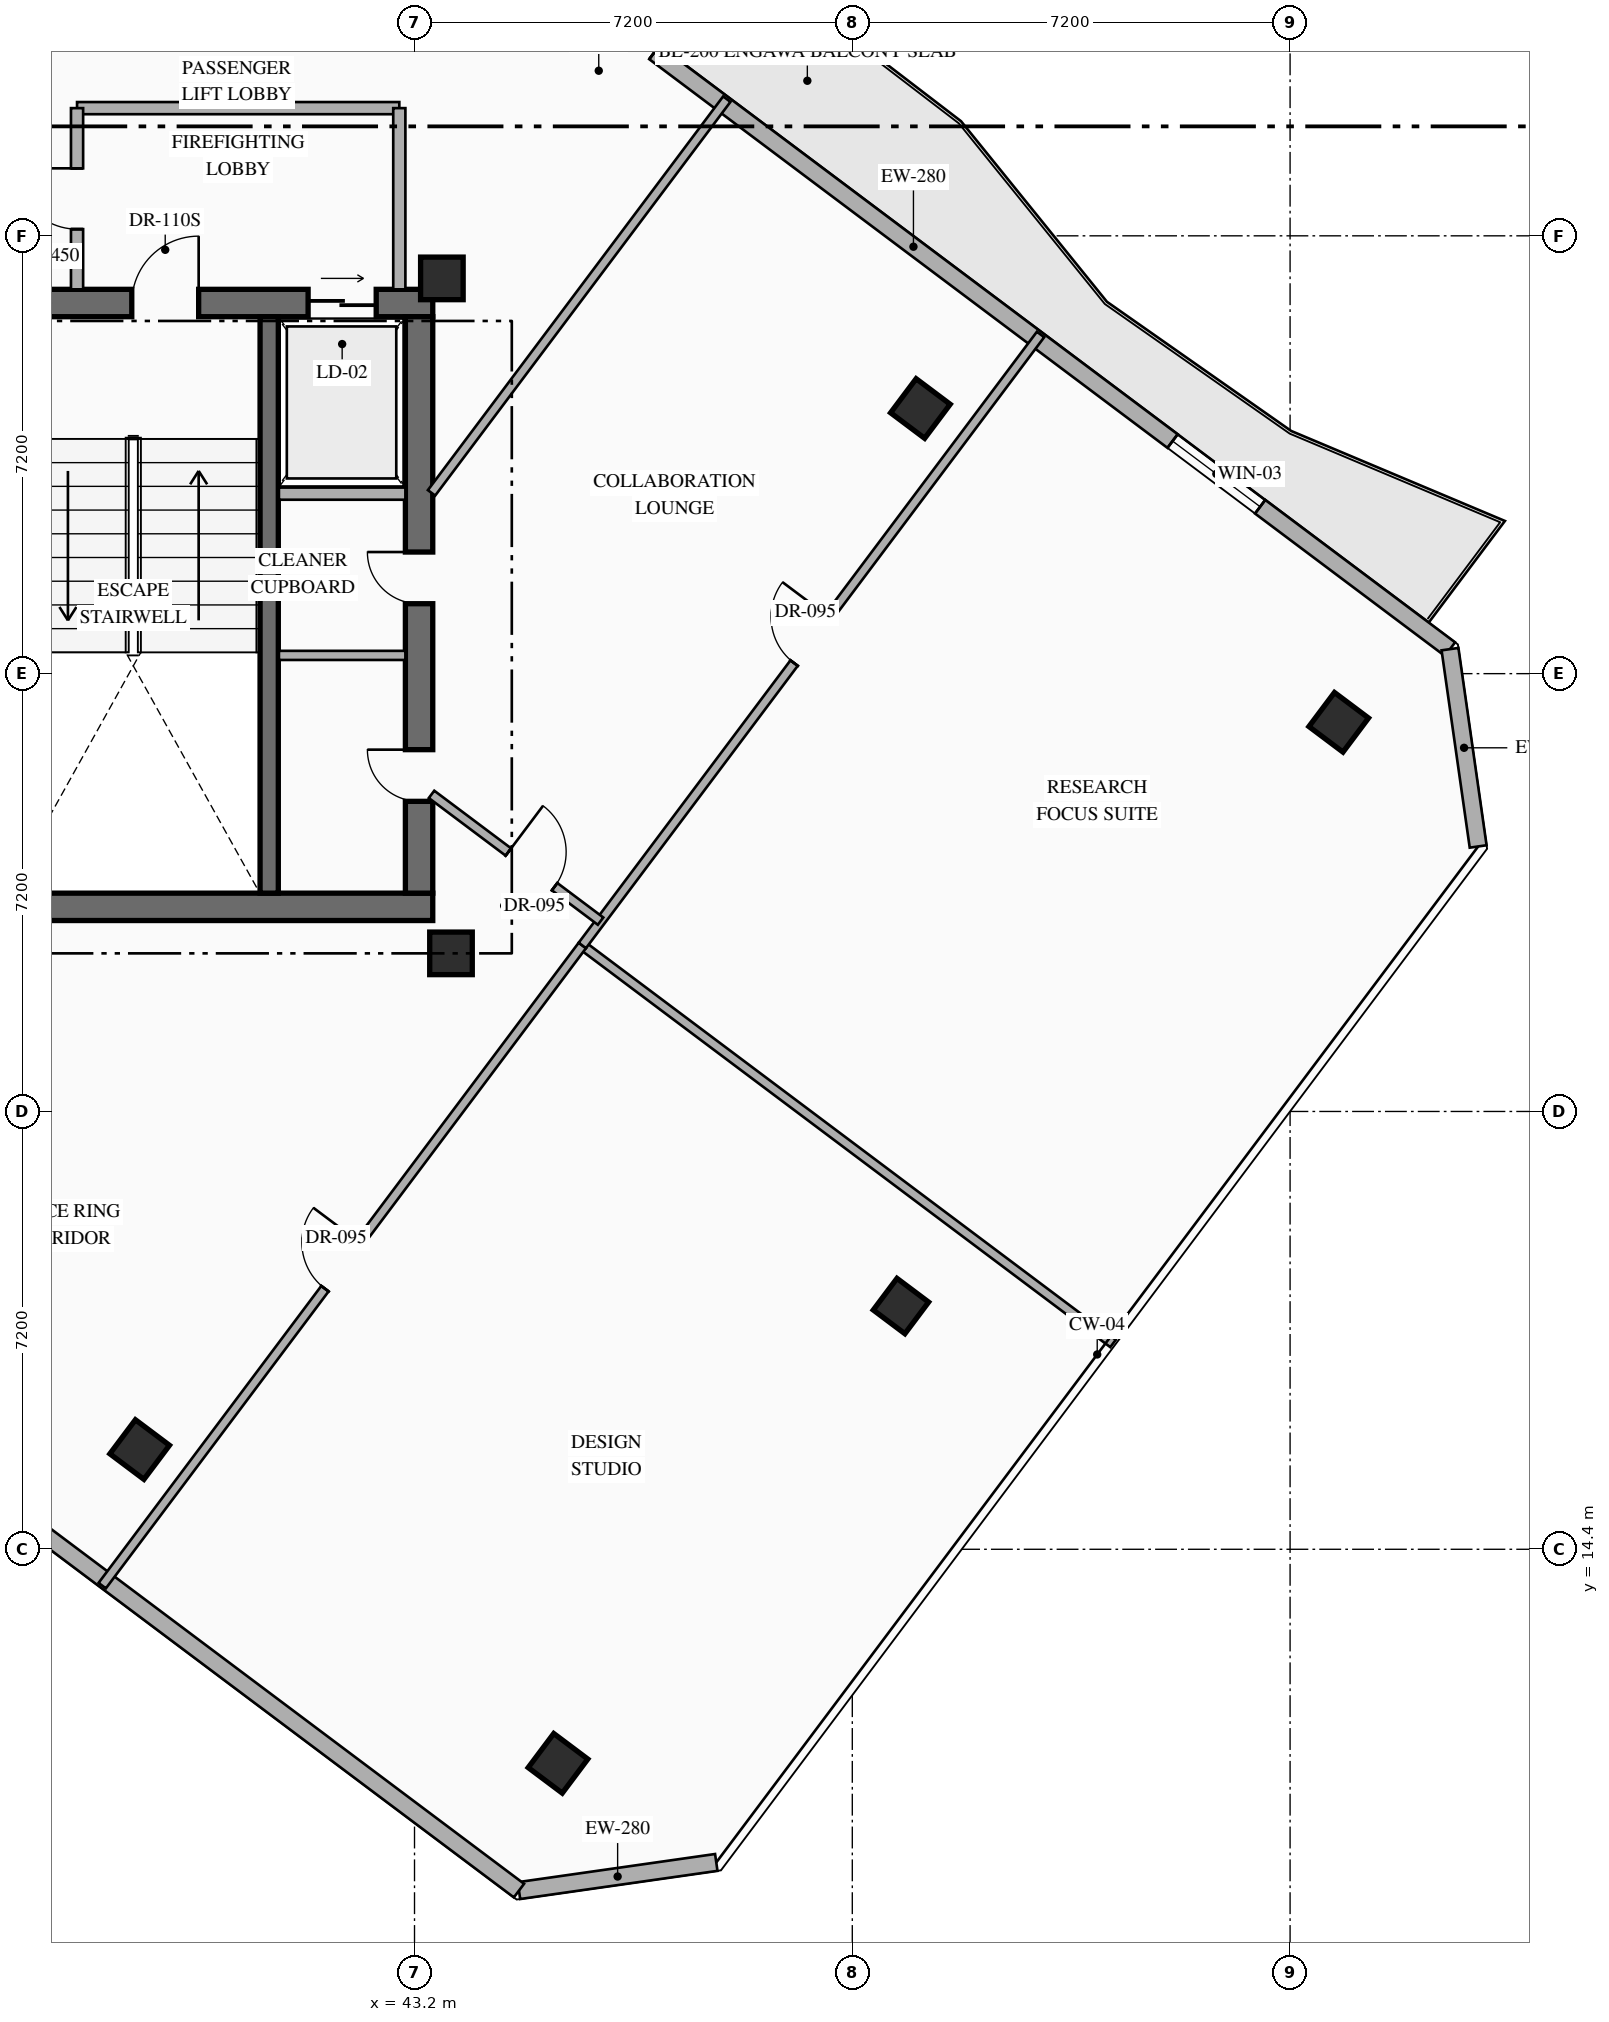
"""IFC4 building model, lengths in metres.
Left out: names, types, materials, properties, quantities, classifications, styles, units other than length and angle.
Written with IfcOpenShell. Run it as: python <this file> out.ifc"""

import sys

from ifc_helpers import new_model, si_unit, direction, frame, frame_2d, origin, origin_2d, place, context, subcontext, project, spatial, rectangle, hollow_rectangle, extrude, element, fill, save


model = new_model("IFC4")
c1 = context("Model", 3, precision=1e-05, world=origin(), true_north=direction((0.0, 1.0)))
c2 = subcontext(c1, "Body", "Model", "MODEL_VIEW")
j1 = project(units=[si_unit("LENGTHUNIT", "METRE"), si_unit("PLANEANGLEUNIT", "RADIAN")], contexts=[c1])
p1 = place(None, origin())
s1 = spatial("IfcSite", under=j1, at=p1, CompositionType="ELEMENT")
p2 = place(p1, origin())
s2 = spatial("IfcBuilding", under=s1, at=p2, CompositionType="ELEMENT")
p3 = place(p2, frame((0.0, 0.0, 231.15)))
s3 = spatial("IfcBuildingStorey", under=s2, at=p3, CompositionType="ELEMENT", Elevation=231.15)
p4 = place(p3, frame((36.04, 24.965, 0.0), z_axis=(0.0, 0.0, 1.0), x_axis=(1.0, 0.0, 0.0)))
e1 = element("IfcWall", 1, at=p4, inside=s3, PredefinedType="SHEAR", context=c2, shape_type="SweptSolid", body=[
    extrude(rectangle(XDim=7.46, YDim=0.45, at=frame_2d((3.73, 0.0))), origin(), (0.0, 0.0, 1.0), 3.6),
])
p5 = place(p3, frame((36.04, 34.895, 0.0), z_axis=(0.0, 0.0, 1.0), x_axis=(1.0, 0.0, 0.0)))
e2 = element("IfcWall", 2, at=p5, inside=s3, PredefinedType="SHEAR", context=c2, shape_type="SweptSolid", body=[
    extrude(rectangle(XDim=7.46, YDim=0.45, at=frame_2d((3.73, 0.0))), origin(), (0.0, 0.0, 1.0), 3.6),
])
p6 = place(p5, frame((2.51, 0.0, 0.0)))
e3 = element("IfcOpeningElement", 3, at=p6, cuts=e2, PredefinedType="OPENING", context=c2, shape_type="SweptSolid", body=[
    extrude(rectangle(XDim=1.1, YDim=2.2, at=frame_2d((0.55, 1.1))), frame((0.0, 0.235, 0.0), z_axis=(0.0, -1.0, 0.0), x_axis=(1.0, 0.0, 0.0)), (0.0, 0.0, 1.0), 0.47),
])
p7 = place(p5, frame((5.41, 0.0, 0.0)))
e4 = element("IfcOpeningElement", 4, at=p7, cuts=e2, PredefinedType="OPENING", context=c2, shape_type="SweptSolid", body=[
    extrude(rectangle(XDim=1.12, YDim=2.15, at=frame_2d((0.56, 1.075))), frame((0.0, 0.235, 0.0), z_axis=(0.0, -1.0, 0.0), x_axis=(1.0, 0.0, 0.0)), (0.0, 0.0, 1.0), 0.47),
])
p8 = place(p3, frame((43.275, 25.19, 0.0), z_axis=(0.0, 0.0, 1.0), x_axis=(0.0, 1.0, 0.0)))
e5 = element("IfcWall", 5, at=p8, inside=s3, PredefinedType="SHEAR", context=c2, shape_type="SweptSolid", body=[
    extrude(rectangle(XDim=9.48, YDim=0.45, at=frame_2d((4.74, 0.0))), origin(), (0.0, 0.0, 1.0), 3.6),
])
p9 = place(p8, frame((1.51, 0.0, 0.0)))
e6 = element("IfcOpeningElement", 6, at=p9, cuts=e5, PredefinedType="OPENING", context=c2, shape_type="SweptSolid", body=[
    extrude(rectangle(XDim=0.85, YDim=2.08, at=frame_2d((0.425, 1.04))), frame((0.0, 0.235, 0.0), z_axis=(0.0, -1.0, 0.0), x_axis=(1.0, 0.0, 0.0)), (0.0, 0.0, 1.0), 0.47),
])
p10 = place(p8, frame((4.76, 0.0, 0.0)))
e7 = element("IfcOpeningElement", 7, at=p10, cuts=e5, PredefinedType="OPENING", context=c2, shape_type="SweptSolid", body=[
    extrude(rectangle(XDim=0.85, YDim=2.08, at=frame_2d((0.425, 1.04))), frame((0.0, 0.235, 0.0), z_axis=(0.0, -1.0, 0.0), x_axis=(1.0, 0.0, 0.0)), (0.0, 0.0, 1.0), 0.47),
])
p11 = place(p3, frame((40.81, 25.19, 0.0), z_axis=(0.0, 0.0, 1.0), x_axis=(0.0, 1.0, 0.0)))
e8 = element("IfcWall", 8, at=p11, inside=s3, PredefinedType="SHEAR", context=c2, shape_type="SweptSolid", body=[
    extrude(rectangle(XDim=9.48, YDim=0.3, at=frame_2d((4.74, 0.0))), origin(), (0.0, 0.0, 1.0), 3.6),
])
for number, where, z_axis, x_axis in (
    (9, (43.8, 24.2, 0.0), (0.0, 0.0, 1.0), (1.0, 0.0, 0.0)),
    (10, (43.65, 35.3, 0.0), (0.0, 0.0, 1.0), (1.0, 0.0, 0.0)),
    (11, (38.68, 16.04, 0.0), (0.0, 0.0, 1.0), (0.8, -0.6, 0.0)),
    (12, (51.52, 33.16, 0.0), (0.0, 0.0, 1.0), (0.8, -0.6, 0.0)),
):
    element("IfcColumn", number, at=place(p3, frame(where, z_axis=z_axis, x_axis=x_axis)), inside=s3, PredefinedType="COLUMN", context=c2, shape_type="SweptSolid", body=[
        extrude(hollow_rectangle(XDim=0.7, YDim=0.7, WallThickness=0.028, at=origin_2d()), origin(), (0.0, 0.0, 1.0), 3.6),
    ])
for number, where, z_axis, x_axis in (
    (13, (45.56, 10.88, 0.0), (0.0, 0.0, 1.0), (0.8, -0.6, 0.0)),
    (14, (58.4, 28.0, 0.0), (0.0, 0.0, 1.0), (0.8, -0.6, 0.0)),
):
    element("IfcColumn", number, at=place(p3, frame(where, z_axis=z_axis, x_axis=x_axis)), inside=s3, PredefinedType="COLUMN", context=c2, shape_type="SweptSolid", body=[
        extrude(hollow_rectangle(XDim=0.7, YDim=0.7, WallThickness=0.028, at=origin_2d()), origin(), (0.0, 0.0, 1.0), 3.268),
    ])
p12 = place(p3, frame((51.2, 18.4, 0.0), z_axis=(0.0, 0.0, 1.0), x_axis=(0.799999996291, -0.600000004945, 0.0)))
e15 = element("IfcColumn", 15, at=p12, inside=s3, PredefinedType="COLUMN", context=c2, shape_type="SweptSolid", body=[
    extrude(hollow_rectangle(XDim=0.65, YDim=0.65, WallThickness=0.025, at=origin_2d()), origin(), (0.0, 0.0, 1.0), 3.268),
])
p13 = place(p3, frame((44.86, 40.73, 0.0), z_axis=(0.0, 0.0, 1.0), x_axis=(0.800007624502, -0.599989833863, 0.0)))
e16 = element("IfcWall", 16, at=p13, inside=s3, PredefinedType="STANDARD", context=c2, shape_type="SweptSolid", body=[
    extrude(rectangle(XDim=19.212, YDim=0.28, at=frame_2d((9.606, 0.0))), origin(), (0.0, 0.0, 1.0), 3.3),
])
p14 = place(p13, frame((1.755, 0.0, 0.0)))
e17 = element("IfcOpeningElement", 17, at=p14, cuts=e16, PredefinedType="OPENING", context=c2, shape_type="SweptSolid", body=[
    extrude(rectangle(XDim=1.1, YDim=2.2, at=frame_2d((0.55, 1.1))), frame((0.0, 0.15, 0.0), z_axis=(0.0, -1.0, 0.0), x_axis=(1.0, 0.0, 0.0)), (0.0, 0.0, 1.0), 0.3),
])
p15 = place(p13, frame((13.509, 0.0, 0.85)))
e18 = element("IfcOpeningElement", 18, at=p15, cuts=e16, PredefinedType="OPENING", context=c2, shape_type="SweptSolid", body=[
    extrude(rectangle(XDim=1.8, YDim=2.1, at=frame_2d((0.9, 1.05))), frame((0.0, 0.15, 0.0), z_axis=(0.0, -1.0, 0.0), x_axis=(1.0, 0.0, 0.0)), (0.0, 0.0, 1.0), 0.3),
])
p16 = place(p3, frame((60.23, 29.203, 0.0), z_axis=(0.0, 0.0, 1.0), x_axis=(0.141296221922, -0.989967361922, 0.0)))
e19 = element("IfcWall", 19, at=p16, inside=s3, PredefinedType="STANDARD", context=c2, shape_type="SweptSolid", body=[
    extrude(rectangle(XDim=3.278, YDim=0.28, at=frame_2d((1.639, 0.0))), origin(), (0.0, 0.0, 1.0), 3.3),
])
p17 = place(p3, frame((48.163, 9.25, 0.0), z_axis=(0.0, 0.0, 1.0), x_axis=(-0.989979263428, -0.141212810973, 0.0)))
e20 = element("IfcWall", 20, at=p17, inside=s3, PredefinedType="STANDARD", context=c2, shape_type="SweptSolid", body=[
    extrude(rectangle(XDim=3.278, YDim=0.28, at=frame_2d((1.639, 0.0))), origin(), (0.0, 0.0, 1.0), 3.3),
])
p18 = place(p3, frame((44.918, 8.787, 0.0), z_axis=(0.0, 0.0, 1.0), x_axis=(-0.800004765927, 0.599993645378, 0.0)))
e21 = element("IfcWall", 21, at=p18, inside=s3, PredefinedType="STANDARD", context=c2, shape_type="SweptSolid", body=[
    extrude(rectangle(XDim=24.588, YDim=0.28, at=frame_2d((12.294, 0.0))), origin(), (0.0, 0.0, 1.0), 3.3),
])
p19 = place(p3, frame((40.97, 31.76, 0.0), z_axis=(0.0, 0.0, 1.0), x_axis=(1.0, 0.0, 0.0)))
e22 = element("IfcWall", 22, at=p19, inside=s3, PredefinedType="STANDARD", context=c2, shape_type="SweptSolid", body=[
    extrude(rectangle(XDim=2.08, YDim=0.2, at=frame_2d((1.04, 0.0))), origin(), (0.0, 0.0, 1.0), 3.3),
])
p20 = place(p3, frame((40.97, 29.1, 0.0), z_axis=(0.0, 0.0, 1.0), x_axis=(1.0, 0.0, 0.0)))
e23 = element("IfcWall", 23, at=p20, inside=s3, PredefinedType="PARTITIONING", context=c2, shape_type="SweptSolid", body=[
    extrude(rectangle(XDim=2.08, YDim=0.15, at=frame_2d((1.04, 0.0))), origin(), (0.0, 0.0, 1.0), 3.3),
])
p21 = place(p3, frame((37.65, 38.1, 0.0), z_axis=(0.0, 0.0, 1.0), x_axis=(1.0, 0.0, 0.0)))
e24 = element("IfcWall", 24, at=p21, inside=s3, PredefinedType="STANDARD", context=c2, shape_type="SweptSolid", body=[
    extrude(rectangle(XDim=5.3, YDim=0.2, at=frame_2d((2.65, 0.0))), origin(), (0.0, 0.0, 1.0), 3.3),
])
p22 = place(p3, frame((42.95, 35.12, 0.0), z_axis=(0.0, 0.0, 1.0), x_axis=(0.0, 1.0, 0.0)))
e25 = element("IfcWall", 25, at=p22, inside=s3, PredefinedType="STANDARD", context=c2, shape_type="SweptSolid", body=[
    extrude(rectangle(XDim=2.98, YDim=0.2, at=frame_2d((1.49, 0.0))), origin(), (0.0, 0.0, 1.0), 3.3),
])
p23 = place(p3, frame((37.65, 35.12, 0.0), z_axis=(0.0, 0.0, 1.0), x_axis=(0.0, 1.0, 0.0)))
e26 = element("IfcWall", 26, at=p23, inside=s3, PredefinedType="STANDARD", context=c2, shape_type="SweptSolid", body=[
    extrude(rectangle(XDim=2.98, YDim=0.2, at=frame_2d((1.49, 0.0))), origin(), (0.0, 0.0, 1.0), 3.3),
])
p24 = place(p23, frame((0.99, 0.0, 0.0)))
e27 = element("IfcOpeningElement", 27, at=p24, cuts=e26, PredefinedType="OPENING", context=c2, shape_type="SweptSolid", body=[
    extrude(rectangle(XDim=1.0, YDim=2.2, at=frame_2d((0.5, 1.1))), frame((0.0, 0.11, 0.0), z_axis=(0.0, -1.0, 0.0), x_axis=(1.0, 0.0, 0.0)), (0.0, 0.0, 1.0), 0.22),
])
p25 = place(p3, frame((45.96, 24.33, 0.0), z_axis=(0.0, 0.0, 1.0), x_axis=(0.799994629375, -0.600007160767, 0.0)))
e28 = element("IfcWall", 28, at=p25, inside=s3, PredefinedType="PARTITIONING", context=c2, shape_type="SweptSolid", body=[
    extrude(rectangle(XDim=10.91, YDim=0.15, at=frame_2d((5.455, 0.0))), origin(), (0.0, 0.0, 1.0), 3.3),
])
p26 = place(p3, frame((38.064, 13.802, 0.0), z_axis=(0.0, 0.0, 1.0), x_axis=(0.599997031734, 0.800002226191, 0.0)))
e29 = element("IfcWall", 29, at=p26, inside=s3, PredefinedType="PARTITIONING", context=c2, shape_type="SweptSolid", body=[
    extrude(rectangle(XDim=13.16, YDim=0.15, at=frame_2d((6.58, 0.0))), origin(), (0.0, 0.0, 1.0), 3.3),
])
p27 = place(p26, frame((6.105, 0.0, 0.0)))
e30 = element("IfcOpeningElement", 30, at=p27, cuts=e29, PredefinedType="OPENING", context=c2, shape_type="SweptSolid", body=[
    extrude(rectangle(XDim=0.95, YDim=2.15, at=frame_2d((0.475, 1.075))), frame((0.0, 0.085, 0.0), z_axis=(0.0, -1.0, 0.0), x_axis=(1.0, 0.0, 0.0)), (0.0, 0.0, 1.0), 0.17),
])
p28 = place(p3, frame((45.96, 24.33, 0.0), z_axis=(0.0, 0.0, 1.0), x_axis=(0.600012440253, 0.799990669659, 0.0)))
e31 = element("IfcWall", 31, at=p28, inside=s3, PredefinedType="PARTITIONING", context=c2, shape_type="SweptSolid", body=[
    extrude(rectangle(XDim=12.56, YDim=0.15, at=frame_2d((6.28, 0.0))), origin(), (0.0, 0.0, 1.0), 3.3),
])
p29 = place(p28, frame((5.805, 0.0, 0.0)))
e32 = element("IfcOpeningElement", 32, at=p29, cuts=e31, PredefinedType="OPENING", context=c2, shape_type="SweptSolid", body=[
    extrude(rectangle(XDim=0.95, YDim=2.15, at=frame_2d((0.475, 1.075))), frame((0.0, 0.085, 0.0), z_axis=(0.0, -1.0, 0.0), x_axis=(1.0, 0.0, 0.0)), (0.0, 0.0, 1.0), 0.17),
])
p30 = place(p3, frame((43.48, 26.815, 0.0), z_axis=(0.0, 0.0, 1.0), x_axis=(0.800008430676, -0.599988758934, 0.0)))
e33 = element("IfcWall", 33, at=p30, inside=s3, PredefinedType="PARTITIONING", context=c2, shape_type="SweptSolid", body=[
    extrude(rectangle(XDim=3.475, YDim=0.15, at=frame_2d((1.738, 0.0))), origin(), (0.0, 0.0, 1.0), 3.3),
])
p31 = place(p30, frame((1.58, 0.0, 0.0)))
e34 = element("IfcOpeningElement", 34, at=p31, cuts=e33, PredefinedType="OPENING", context=c2, shape_type="SweptSolid", body=[
    extrude(rectangle(XDim=0.95, YDim=2.15, at=frame_2d((0.475, 1.075))), frame((0.0, 0.085, 0.0), z_axis=(0.0, -1.0, 0.0), x_axis=(1.0, 0.0, 0.0)), (0.0, 0.0, 1.0), 0.17),
])
p32 = place(p3, frame((43.48, 31.773, 0.0), z_axis=(0.0, 0.0, 1.0), x_axis=(0.599971041729, 0.800021717885, 0.0)))
e35 = element("IfcWall", 35, at=p32, inside=s3, PredefinedType="PARTITIONING", context=c2, shape_type="SweptSolid", body=[
    extrude(rectangle(XDim=8.094, YDim=0.15, at=frame_2d((4.047, 0.0))), origin(), (0.0, 0.0, 1.0), 3.3),
])
p33 = place(p14, origin())
e36 = element("IfcDoor", 36, at=p33, inside=s3, OperationType="SINGLE_SWING_LEFT", PredefinedType="DOOR", context=c2, shape_type="SweptSolid", body=[
    extrude(rectangle(XDim=1.1, YDim=2.2, at=frame_2d((0.55, 1.1))), frame((0.0, 0.025, 0.0), z_axis=(0.0, -1.0, 0.0), x_axis=(1.0, 0.0, 0.0)), (0.0, 0.0, 1.0), 0.05),
])
fill(e17, e36)
p34 = place(p15, origin())
e37 = element("IfcWindow", 37, at=p34, inside=s3, PartitioningType="SINGLE_PANEL", PredefinedType="WINDOW", context=c2, shape_type="SweptSolid", body=[
    extrude(rectangle(XDim=1.8, YDim=2.1, at=frame_2d((0.9, 1.05))), frame((0.0, 0.03, 0.0), z_axis=(0.0, -1.0, 0.0), x_axis=(1.0, 0.0, 0.0)), (0.0, 0.0, 1.0), 0.06),
])
fill(e18, e37)
p35 = place(p6, origin())
e38 = element("IfcDoor", 38, at=p35, inside=s3, OperationType="SINGLE_SWING_RIGHT", PredefinedType="DOOR", context=c2, shape_type="SweptSolid", body=[
    extrude(rectangle(XDim=1.1, YDim=2.2, at=frame_2d((0.55, 1.1))), frame((0.0, 0.025, 0.0), z_axis=(0.0, -1.0, 0.0), x_axis=(1.0, 0.0, 0.0)), (0.0, 0.0, 1.0), 0.05),
])
fill(e3, e38)
p36 = place(p7, origin())
e39 = element("IfcDoor", 39, at=p36, inside=s3, OperationType="SLIDING_TO_RIGHT", PredefinedType="USERDEFINED", context=c2, shape_type="SweptSolid", body=[
    extrude(rectangle(XDim=1.12, YDim=2.15, at=frame_2d((0.56, 1.075))), frame((0.0, 0.025, 0.0), z_axis=(0.0, -1.0, 0.0), x_axis=(1.0, 0.0, 0.0)), (0.0, 0.0, 1.0), 0.05),
])
fill(e4, e39)
p37 = place(p9, origin())
e40 = element("IfcDoor", 40, at=p37, inside=s3, OperationType="SINGLE_SWING_RIGHT", PredefinedType="DOOR", context=c2, shape_type="SweptSolid", body=[
    extrude(rectangle(XDim=0.85, YDim=2.08, at=frame_2d((0.425, 1.04))), frame((0.0, 0.025, 0.0), z_axis=(0.0, -1.0, 0.0), x_axis=(1.0, 0.0, 0.0)), (0.0, 0.0, 1.0), 0.05),
])
fill(e6, e40)
p38 = place(p10, origin())
e41 = element("IfcDoor", 41, at=p38, inside=s3, OperationType="SINGLE_SWING_RIGHT", PredefinedType="DOOR", context=c2, shape_type="SweptSolid", body=[
    extrude(rectangle(XDim=0.85, YDim=2.08, at=frame_2d((0.425, 1.04))), frame((0.0, 0.025, 0.0), z_axis=(0.0, -1.0, 0.0), x_axis=(1.0, 0.0, 0.0)), (0.0, 0.0, 1.0), 0.05),
])
fill(e7, e41)
p39 = place(p24, origin())
e42 = element("IfcDoor", 42, at=p39, inside=s3, OperationType="SINGLE_SWING_RIGHT", PredefinedType="DOOR", context=c2, shape_type="SweptSolid", body=[
    extrude(rectangle(XDim=1.0, YDim=2.2, at=frame_2d((0.5, 1.1))), frame((0.0, 0.025, 0.0), z_axis=(0.0, -1.0, 0.0), x_axis=(1.0, 0.0, 0.0)), (0.0, 0.0, 1.0), 0.05),
])
fill(e27, e42)
p40 = place(p27, origin())
e43 = element("IfcDoor", 43, at=p40, inside=s3, OperationType="SINGLE_SWING_RIGHT", PredefinedType="DOOR", context=c2, shape_type="SweptSolid", body=[
    extrude(rectangle(XDim=0.95, YDim=2.15, at=frame_2d((0.475, 1.075))), frame((0.0, 0.025, 0.0), z_axis=(0.0, -1.0, 0.0), x_axis=(1.0, 0.0, 0.0)), (0.0, 0.0, 1.0), 0.05),
])
fill(e30, e43)
p41 = place(p29, origin())
e44 = element("IfcDoor", 44, at=p41, inside=s3, OperationType="SINGLE_SWING_RIGHT", PredefinedType="DOOR", context=c2, shape_type="SweptSolid", body=[
    extrude(rectangle(XDim=0.95, YDim=2.15, at=frame_2d((0.475, 1.075))), frame((0.0, 0.025, 0.0), z_axis=(0.0, -1.0, 0.0), x_axis=(1.0, 0.0, 0.0)), (0.0, 0.0, 1.0), 0.05),
])
fill(e32, e44)
p42 = place(p31, origin())
e45 = element("IfcDoor", 45, at=p42, inside=s3, OperationType="SINGLE_SWING_LEFT", PredefinedType="DOOR", context=c2, shape_type="SweptSolid", body=[
    extrude(rectangle(XDim=0.95, YDim=2.15, at=frame_2d((0.475, 1.075))), frame((0.0, 0.025, 0.0), z_axis=(0.0, -1.0, 0.0), x_axis=(1.0, 0.0, 0.0)), (0.0, 0.0, 1.0), 0.05),
])
fill(e34, e45)
save(model, sys.argv[1])
